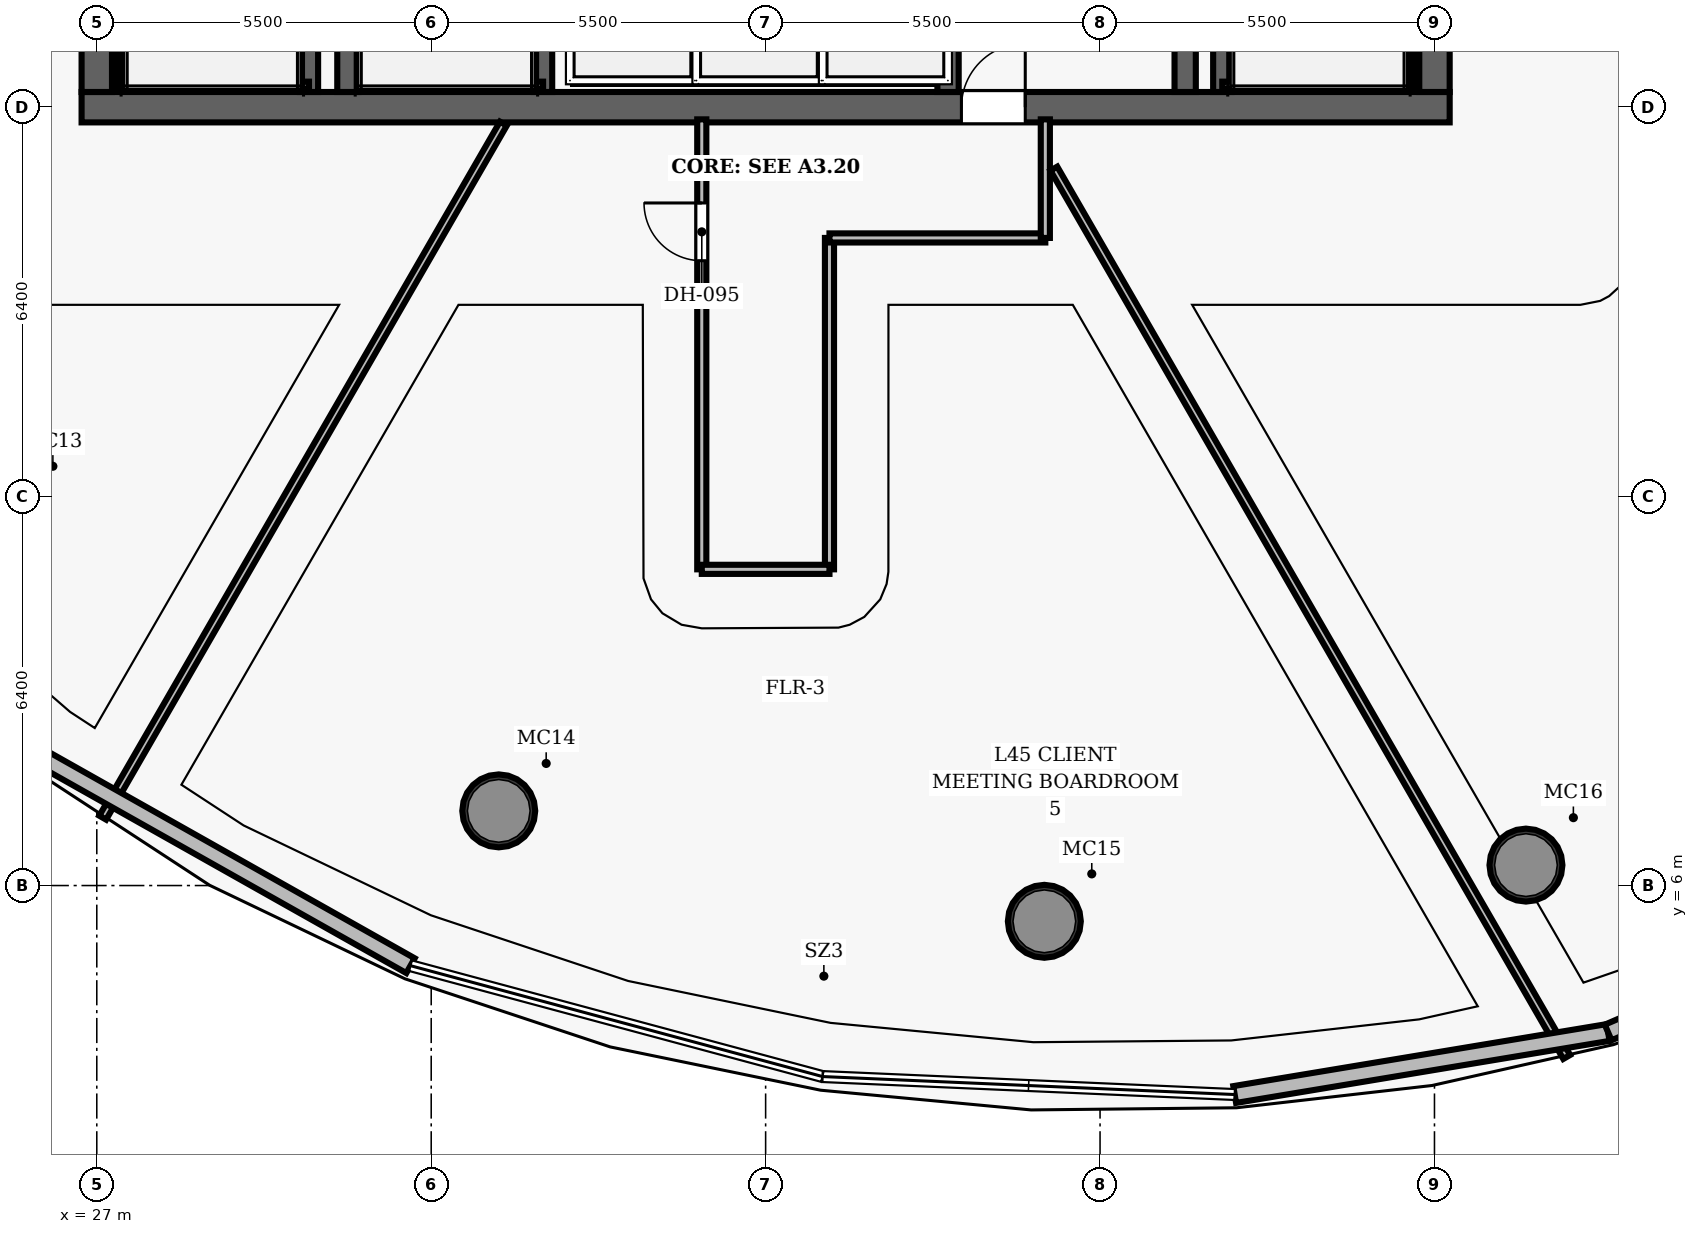
"""IFC4 building model, lengths in metres.
Left out: names, types, materials, properties, quantities, classifications, styles, units other than length and angle.
Written with IfcOpenShell. Run it as: python <this file> out.ifc"""

import sys

from ifc_helpers import new_model, si_unit, direction, frame, frame_2d, origin, origin_2d, place, context, subcontext, project, spatial, rectangle, hollow_circle, extrude, element, fill, save


model = new_model("IFC4")
c1 = context("Model", 3, precision=1e-05, world=origin(), true_north=direction((0.0, 1.0)))
c2 = subcontext(c1, "Body", "Model", "MODEL_VIEW")
j1 = project(units=[si_unit("LENGTHUNIT", "METRE"), si_unit("PLANEANGLEUNIT", "RADIAN")], contexts=[c1])
p1 = place(None, origin())
s1 = spatial("IfcSite", under=j1, at=p1, CompositionType="ELEMENT")
p2 = place(p1, origin())
s2 = spatial("IfcBuilding", under=s1, at=p2, CompositionType="ELEMENT")
p3 = place(p2, frame((0.0, 0.0, 178.9)))
s3 = spatial("IfcBuildingStorey", under=s2, at=p3, CompositionType="ELEMENT", Elevation=178.9)
p4 = place(p3, frame((26.75, 18.8, 0.0), z_axis=(0.0, 0.0, 1.0), x_axis=(1.0, 0.0, 0.0)))
e1 = element("IfcWall", 1, at=p4, inside=s3, PredefinedType="SHEAR", context=c2, shape_type="SweptSolid", body=[
    extrude(rectangle(XDim=22.5, YDim=0.5, at=frame_2d((11.25, 0.0))), origin(), (0.0, 0.0, 1.0), 3.85),
])
p5 = place(p4, frame((14.47, 0.0, 0.0)))
e2 = element("IfcOpeningElement", 2, at=p5, cuts=e1, PredefinedType="OPENING", context=c2, shape_type="SweptSolid", body=[
    extrude(rectangle(XDim=1.05, YDim=2.15, at=frame_2d((0.525, 1.075))), frame((0.0, 0.26, 0.0), z_axis=(0.0, -1.0, 0.0), x_axis=(1.0, 0.0, 0.0)), (0.0, 0.0, 1.0), 0.52),
])
p6 = place(p3, frame((27.0, 19.05, 0.0), z_axis=(0.0, 0.0, 1.0), x_axis=(0.0, 1.0, 0.0)))
e3 = element("IfcWall", 3, at=p6, inside=s3, PredefinedType="SHEAR", context=c2, shape_type="SweptSolid", body=[
    extrude(rectangle(XDim=13.9, YDim=0.5, at=frame_2d((6.95, 0.0))), origin(), (0.0, 0.0, 1.0), 3.85),
])
p7 = place(p6, frame((8.2, 0.0, 0.0)))
e4 = element("IfcOpeningElement", 4, at=p7, cuts=e3, PredefinedType="OPENING", context=c2, shape_type="SweptSolid", body=[
    extrude(rectangle(XDim=1.05, YDim=2.15, at=frame_2d((0.525, 1.075))), frame((0.0, 0.26, 0.0), z_axis=(0.0, -1.0, 0.0), x_axis=(1.0, 0.0, 0.0)), (0.0, 0.0, 1.0), 0.52),
])
p8 = place(p3, frame((49.0, 19.05, 0.0), z_axis=(0.0, 0.0, 1.0), x_axis=(0.0, 1.0, 0.0)))
e5 = element("IfcWall", 5, at=p8, inside=s3, PredefinedType="SHEAR", context=c2, shape_type="SweptSolid", body=[
    extrude(rectangle(XDim=13.9, YDim=0.5, at=frame_2d((6.95, 0.0))), origin(), (0.0, 0.0, 1.0), 3.85),
])
p9 = place(p8, frame((8.2, 0.0, 0.0)))
e6 = element("IfcOpeningElement", 6, at=p9, cuts=e5, PredefinedType="OPENING", context=c2, shape_type="SweptSolid", body=[
    extrude(rectangle(XDim=1.05, YDim=2.15, at=frame_2d((0.525, 1.075))), frame((0.0, 0.26, 0.0), z_axis=(0.0, -1.0, 0.0), x_axis=(1.0, 0.0, 0.0)), (0.0, 0.0, 1.0), 0.52),
])
for number, where, z_axis, x_axis in (
    (7, (31.13, 19.05, 0.0), (0.0, 0.0, 1.0), (0.0, 1.0, 0.0)),
    (8, (44.9, 19.05, 0.0), (0.0, 0.0, 1.0), (0.0, 1.0, 0.0)),
):
    element("IfcWall", number, at=place(p3, frame(where, z_axis=z_axis, x_axis=x_axis)), inside=s3, PredefinedType="SHEAR", context=c2, shape_type="SweptSolid", body=[
        extrude(rectangle(XDim=13.9, YDim=0.35, at=frame_2d((6.95, 0.0))), origin(), (0.0, 0.0, 1.0), 3.85),
    ])
for number, where, z_axis, x_axis in (
    (9, (33.611, 7.228, 0.0), (0.0, 0.0, 1.0), (1.0, 0.0, 0.0)),
    (10, (42.584, 5.412, 0.0), (0.0, 0.0, 1.0), (1.0, 0.0, 0.0)),
    (11, (50.504, 6.336, 0.0), (0.0, 0.0, 1.0), (1.0, 0.0, 0.0)),
):
    element("IfcColumn", number, at=place(p3, frame(where, z_axis=z_axis, x_axis=x_axis)), inside=s3, PredefinedType="COLUMN", context=c2, shape_type="SweptSolid", body=[
        extrude(hollow_circle(Radius=0.6, WallThickness=0.05, at=origin_2d()), origin(), (0.0, 0.0, 1.0), 3.85),
    ])
p10 = place(p3, frame((30.49, 19.05, 0.0), z_axis=(0.0, 0.0, 1.0), x_axis=(0.0, 1.0, 0.0)))
e12 = element("IfcWall", 12, at=p10, inside=s3, PredefinedType="SHEAR", context=c2, shape_type="SweptSolid", body=[
    extrude(rectangle(XDim=7.5, YDim=0.3, at=frame_2d((3.75, 0.0))), origin(), (0.0, 0.0, 1.0), 3.85),
])
p11 = place(p3, frame((27.395, 19.1, 0.0), z_axis=(0.0, 0.0, 1.0), x_axis=(0.0, 1.0, 0.0)))
e13 = element("IfcWall", 13, at=p11, inside=s3, PredefinedType="SHEAR", context=c2, shape_type="SweptSolid", body=[
    extrude(rectangle(XDim=7.45, YDim=0.12, at=frame_2d((3.725, 0.0))), origin(), (0.0, 0.0, 1.0), 3.85),
])
p12 = place(p3, frame((27.395, 19.16, 0.0), z_axis=(0.0, 0.0, 1.0), x_axis=(1.0, 0.0, 0.0)))
e14 = element("IfcWall", 14, at=p12, inside=s3, PredefinedType="SHEAR", context=c2, shape_type="SweptSolid", body=[
    extrude(rectangle(XDim=3.095, YDim=0.12, at=frame_2d((1.547, 0.0))), origin(), (0.0, 0.0, 1.0), 3.85),
])
p13 = place(p3, frame((45.51, 19.05, 0.0), z_axis=(0.0, 0.0, 1.0), x_axis=(0.0, 1.0, 0.0)))
e15 = element("IfcWall", 15, at=p13, inside=s3, PredefinedType="SHEAR", context=c2, shape_type="SweptSolid", body=[
    extrude(rectangle(XDim=7.5, YDim=0.3, at=frame_2d((3.75, 0.0))), origin(), (0.0, 0.0, 1.0), 3.85),
])
p14 = place(p3, frame((48.605, 19.1, 0.0), z_axis=(0.0, 0.0, 1.0), x_axis=(0.0, 1.0, 0.0)))
e16 = element("IfcWall", 16, at=p14, inside=s3, PredefinedType="SHEAR", context=c2, shape_type="SweptSolid", body=[
    extrude(rectangle(XDim=7.45, YDim=0.12, at=frame_2d((3.725, 0.0))), origin(), (0.0, 0.0, 1.0), 3.85),
])
p15 = place(p3, frame((45.51, 19.16, 0.0), z_axis=(0.0, 0.0, 1.0), x_axis=(1.0, 0.0, 0.0)))
e17 = element("IfcWall", 17, at=p15, inside=s3, PredefinedType="SHEAR", context=c2, shape_type="SweptSolid", body=[
    extrude(rectangle(XDim=3.095, YDim=0.12, at=frame_2d((1.547, 0.0))), origin(), (0.0, 0.0, 1.0), 3.85),
])
p16 = place(p3, frame((34.34, 19.05, 0.0), z_axis=(0.0, 0.0, 1.0), x_axis=(0.0, 1.0, 0.0)))
e18 = element("IfcWall", 18, at=p16, inside=s3, PredefinedType="SHEAR", context=c2, shape_type="SweptSolid", body=[
    extrude(rectangle(XDim=7.5, YDim=0.3, at=frame_2d((3.75, 0.0))), origin(), (0.0, 0.0, 1.0), 3.85),
])
p17 = place(p3, frame((31.3, 19.16, 0.0), z_axis=(0.0, 0.0, 1.0), x_axis=(1.0, 0.0, 0.0)))
e19 = element("IfcWall", 19, at=p17, inside=s3, PredefinedType="SHEAR", context=c2, shape_type="SweptSolid", body=[
    extrude(rectangle(XDim=3.04, YDim=0.12, at=frame_2d((1.52, 0.0))), origin(), (0.0, 0.0, 1.0), 3.85),
])
p18 = place(p3, frame((41.0, 19.05, 0.0), z_axis=(0.0, 0.0, 1.0), x_axis=(0.0, 1.0, 0.0)))
e20 = element("IfcWall", 20, at=p18, inside=s3, PredefinedType="SHEAR", context=c2, shape_type="SweptSolid", body=[
    extrude(rectangle(XDim=2.08, YDim=0.35, at=frame_2d((1.04, 0.0))), origin(), (0.0, 0.0, 1.0), 3.035),
])
p19 = place(p3, frame((36.95, 11.2, 0.0), z_axis=(0.0, 0.0, 1.0), x_axis=(0.0, 1.0, 0.0)))
e21 = element("IfcWall", 21, at=p19, inside=s3, PredefinedType="PARTITIONING", context=c2, shape_type="SweptSolid", body=[
    extrude(rectangle(XDim=7.4, YDim=0.15, at=frame_2d((3.7, 0.0))), origin(), (0.0, 0.0, 1.0), 3.035),
])
p20 = place(p19, frame((5.075, 0.0, 0.0)))
e22 = element("IfcOpeningElement", 22, at=p20, cuts=e21, PredefinedType="OPENING", context=c2, shape_type="SweptSolid", body=[
    extrude(rectangle(XDim=0.95, YDim=2.15, at=frame_2d((0.475, 1.075))), frame((0.0, 0.085, 0.0), z_axis=(0.0, -1.0, 0.0), x_axis=(1.0, 0.0, 0.0)), (0.0, 0.0, 1.0), 0.17),
])
p21 = place(p3, frame((39.05, 11.2, 0.0), z_axis=(0.0, 0.0, 1.0), x_axis=(0.0, 1.0, 0.0)))
e23 = element("IfcWall", 23, at=p21, inside=s3, PredefinedType="PARTITIONING", context=c2, shape_type="SweptSolid", body=[
    extrude(rectangle(XDim=5.45, YDim=0.15, at=frame_2d((2.725, 0.0))), origin(), (0.0, 0.0, 1.0), 3.035),
])
p22 = place(p3, frame((39.05, 16.65, 0.0), z_axis=(0.0, 0.0, 1.0), x_axis=(1.0, 0.0, 0.0)))
e24 = element("IfcWall", 24, at=p22, inside=s3, PredefinedType="PARTITIONING", context=c2, shape_type="SweptSolid", body=[
    extrude(rectangle(XDim=3.55, YDim=0.15, at=frame_2d((1.775, 0.0))), origin(), (0.0, 0.0, 1.0), 3.035),
])
p23 = place(p3, frame((42.6, 16.65, 0.0), z_axis=(0.0, 0.0, 1.0), x_axis=(0.0, 1.0, 0.0)))
e25 = element("IfcWall", 25, at=p23, inside=s3, PredefinedType="PARTITIONING", context=c2, shape_type="SweptSolid", body=[
    extrude(rectangle(XDim=1.95, YDim=0.15, at=frame_2d((0.975, 0.0))), origin(), (0.0, 0.0, 1.0), 3.035),
])
p24 = place(p3, frame((36.95, 11.2, 0.0), z_axis=(0.0, 0.0, 1.0), x_axis=(1.0, 0.0, 0.0)))
e26 = element("IfcWall", 26, at=p24, inside=s3, PredefinedType="PARTITIONING", context=c2, shape_type="SweptSolid", body=[
    extrude(rectangle(XDim=2.1, YDim=0.15, at=frame_2d((1.05, 0.0))), origin(), (0.0, 0.0, 1.0), 3.035),
])
p25 = place(p3, frame((33.687, 18.53, 0.0), z_axis=(0.0, 0.0, 1.0), x_axis=(-0.499996112969, -0.866027647951, 0.0)))
e27 = element("IfcWall", 27, at=p25, inside=s3, PredefinedType="PARTITIONING", context=c2, shape_type="SweptSolid", body=[
    extrude(rectangle(XDim=13.18, YDim=0.13, at=frame_2d((6.59, 0.0))), origin(), (0.0, 0.0, 1.0), 3.035),
])
p26 = place(p3, frame((42.74, 17.79, 0.0), z_axis=(0.0, 0.0, 1.0), x_axis=(0.500003906344, -0.866023148444, 0.0)))
e28 = element("IfcWall", 28, at=p26, inside=s3, PredefinedType="PARTITIONING", context=c2, shape_type="SweptSolid", body=[
    extrude(rectangle(XDim=16.869, YDim=0.13, at=frame_2d((8.435, 0.0))), origin(), (0.0, 0.0, 1.0), 3.035),
])
p27 = place(p3, frame((32.159, 4.682, 0.0), z_axis=(0.0, 0.0, 1.0), x_axis=(-0.871187511023, 0.490950425845, 0.0)))
e29 = element("IfcWall", 29, at=p27, inside=s3, PredefinedType="SOLIDWALL", context=c2, shape_type="SweptSolid", body=[
    extrude(rectangle(XDim=7.045, YDim=0.28, at=frame_2d((3.523, 0.0))), origin(), (0.0, 0.0, 1.0), 3.62),
])
p28 = place(p3, frame((51.856, 3.583, 0.0), z_axis=(0.0, 0.0, 1.0), x_axis=(-0.986490190097, -0.163820343186, 0.0)))
e30 = element("IfcWall", 30, at=p28, inside=s3, PredefinedType="SOLIDWALL", context=c2, shape_type="SweptSolid", body=[
    extrude(rectangle(XDim=6.227, YDim=0.28, at=frame_2d((3.113, 0.0))), origin(), (0.0, 0.0, 1.0), 3.62),
])
p29 = place(p3, frame((56.872, 5.753, 0.0), z_axis=(0.0, 0.0, 1.0), x_axis=(-0.917776074032, -0.397098322753, 0.0)))
e31 = element("IfcWall", 31, at=p29, inside=s3, PredefinedType="SOLIDWALL", context=c2, shape_type="SweptSolid", body=[
    extrude(rectangle(XDim=5.464, YDim=0.28, at=frame_2d((2.732, 0.0))), origin(), (0.0, 0.0, 1.0), 3.62),
])
p30 = place(p5, origin())
e32 = element("IfcDoor", 32, at=p30, inside=s3, OperationType="SINGLE_SWING_RIGHT", PredefinedType="DOOR", context=c2, shape_type="SweptSolid", body=[
    extrude(rectangle(XDim=1.05, YDim=2.15, at=frame_2d((0.525, 1.075))), frame((0.0, 0.025, 0.0), z_axis=(0.0, -1.0, 0.0), x_axis=(1.0, 0.0, 0.0)), (0.0, 0.0, 1.0), 0.05),
])
fill(e2, e32)
p31 = place(p20, origin())
e33 = element("IfcDoor", 33, at=p31, inside=s3, OperationType="SINGLE_SWING_RIGHT", PredefinedType="DOOR", context=c2, shape_type="SweptSolid", body=[
    extrude(rectangle(XDim=0.95, YDim=2.15, at=frame_2d((0.475, 1.075))), frame((0.0, 0.025, 0.0), z_axis=(0.0, -1.0, 0.0), x_axis=(1.0, 0.0, 0.0)), (0.0, 0.0, 1.0), 0.05),
])
fill(e22, e33)
save(model, sys.argv[1])
